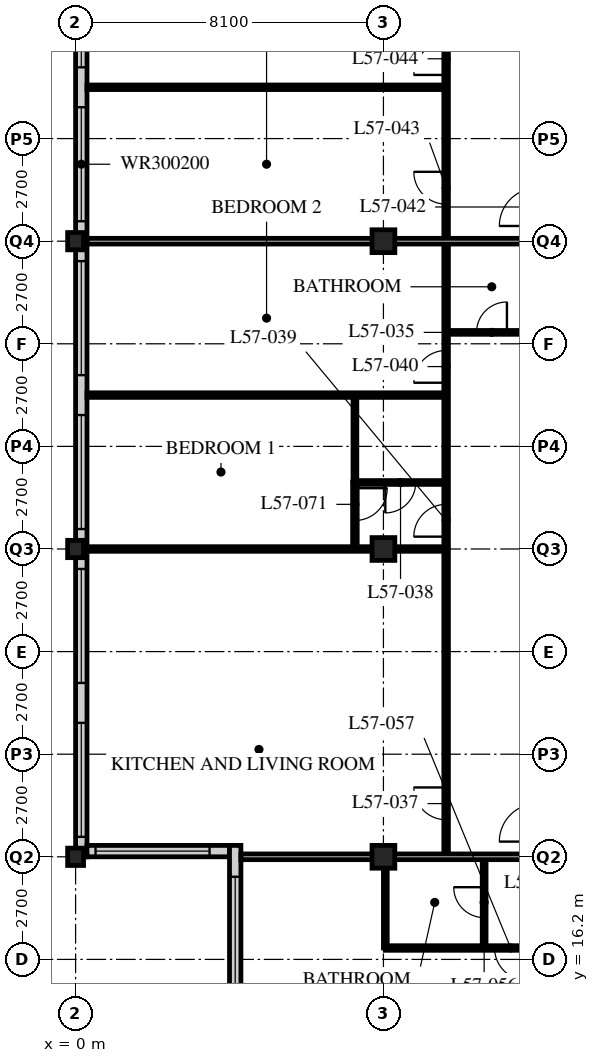
"""IFC4 building model, lengths in metres.
Left out: names, types, materials, properties, quantities, classifications, styles, units other than length and angle.
Written with IfcOpenShell. Run it as: python <this file> out.ifc"""

import sys

from ifc_helpers import new_model, si_unit, direction, frame, frame_2d, origin, origin_2d, place, context, subcontext, project, spatial, rectangle, hollow_rectangle, i_section, extrude, element, fill, save


model = new_model("IFC4")
c1 = context("Model", 3, precision=1e-05, world=origin(), true_north=direction((0.0, 1.0)))
c2 = subcontext(c1, "Body", "Model", "MODEL_VIEW")
j1 = project(units=[si_unit("LENGTHUNIT", "METRE"), si_unit("PLANEANGLEUNIT", "RADIAN")], contexts=[c1])
p1 = place(None, origin())
s1 = spatial("IfcSite", under=j1, at=p1, CompositionType="ELEMENT")
p2 = place(p1, origin())
s2 = spatial("IfcBuilding", under=s1, at=p2, CompositionType="ELEMENT")
p3 = place(p2, frame((0.0, 0.0, 220.8)))
s3 = spatial("IfcBuildingStorey", under=s2, at=p3, CompositionType="ELEMENT", Elevation=220.8)
for number, where, z_axis, x_axis in (
    (1, (0.0, 18.9, 0.0), (0.0, 0.0, 1.0), (1.0, 0.0, 0.0)),
    (2, (0.0, 27.0, 0.0), (0.0, 0.0, 1.0), (1.0, 0.0, 0.0)),
    (3, (0.0, 35.1, 0.0), (0.0, 0.0, 1.0), (1.0, 0.0, 0.0)),
):
    element("IfcColumn", number, at=place(p3, frame(where, z_axis=z_axis, x_axis=x_axis)), inside=s3, PredefinedType="COLUMN", context=c2, shape_type="SweptSolid", body=[
        extrude(i_section(OverallWidth=0.418, OverallDepth=0.456, WebThickness=0.042, FlangeThickness=0.067, FilletRadius=0.015, at=origin_2d()), origin(), (0.0, 0.0, 1.0), 3.6),
    ])
for number, where, z_axis, x_axis in (
    (4, (8.1, 18.9, 0.0), (0.0, 0.0, 1.0), (1.0, 0.0, 0.0)),
    (5, (8.1, 27.0, 0.0), (0.0, 0.0, 1.0), (1.0, 0.0, 0.0)),
    (6, (8.1, 35.1, 0.0), (0.0, 0.0, 1.0), (1.0, 0.0, 0.0)),
):
    element("IfcColumn", number, at=place(p3, frame(where, z_axis=z_axis, x_axis=x_axis)), inside=s3, PredefinedType="COLUMN", context=c2, shape_type="SweptSolid", body=[
        extrude(hollow_rectangle(XDim=0.6, YDim=0.6, WallThickness=0.05, at=origin_2d()), origin(), (0.0, 0.0, 1.0), 3.6),
    ])
p4 = place(p3, frame((0.15, 51.0, 0.0), z_axis=(0.0, 0.0, 1.0), x_axis=(0.0, -1.0, 0.0)))
e7 = element("IfcWall", 7, at=p4, inside=s3, PredefinedType="SOLIDWALL", context=c2, shape_type="SweptSolid", body=[
    extrude(rectangle(XDim=32.1, YDim=0.3, at=frame_2d((16.05, 0.0))), origin(), (0.0, 0.0, 1.0), 3.39),
])
p5 = place(p4, frame((0.225, 0.0, 0.6)))
e8 = element("IfcOpeningElement", 8, at=p5, cuts=e7, PredefinedType="OPENING", context=c2, shape_type="SweptSolid", body=[
    extrude(rectangle(XDim=3.0, YDim=2.0, at=frame_2d((1.5, 1.0))), frame((0.0, 0.16, 0.0), z_axis=(0.0, -1.0, 0.0), x_axis=(1.0, 0.0, 0.0)), (0.0, 0.0, 1.0), 0.32),
])
p6 = place(p4, frame((4.275, 0.0, 0.6)))
e9 = element("IfcOpeningElement", 9, at=p6, cuts=e7, PredefinedType="OPENING", context=c2, shape_type="SweptSolid", body=[
    extrude(rectangle(XDim=3.0, YDim=2.0, at=frame_2d((1.5, 1.0))), frame((0.0, 0.16, 0.0), z_axis=(0.0, -1.0, 0.0), x_axis=(1.0, 0.0, 0.0)), (0.0, 0.0, 1.0), 0.32),
])
p7 = place(p4, frame((8.325, 0.0, 0.6)))
e10 = element("IfcOpeningElement", 10, at=p7, cuts=e7, PredefinedType="OPENING", context=c2, shape_type="SweptSolid", body=[
    extrude(rectangle(XDim=3.0, YDim=2.0, at=frame_2d((1.5, 1.0))), frame((0.0, 0.16, 0.0), z_axis=(0.0, -1.0, 0.0), x_axis=(1.0, 0.0, 0.0)), (0.0, 0.0, 1.0), 0.32),
])
p8 = place(p4, frame((12.375, 0.0, 0.6)))
e11 = element("IfcOpeningElement", 11, at=p8, cuts=e7, PredefinedType="OPENING", context=c2, shape_type="SweptSolid", body=[
    extrude(rectangle(XDim=3.0, YDim=2.0, at=frame_2d((1.5, 1.0))), frame((0.0, 0.16, 0.0), z_axis=(0.0, -1.0, 0.0), x_axis=(1.0, 0.0, 0.0)), (0.0, 0.0, 1.0), 0.32),
])
p9 = place(p4, frame((16.425, 0.0, 0.6)))
e12 = element("IfcOpeningElement", 12, at=p9, cuts=e7, PredefinedType="OPENING", context=c2, shape_type="SweptSolid", body=[
    extrude(rectangle(XDim=3.0, YDim=2.0, at=frame_2d((1.5, 1.0))), frame((0.0, 0.16, 0.0), z_axis=(0.0, -1.0, 0.0), x_axis=(1.0, 0.0, 0.0)), (0.0, 0.0, 1.0), 0.32),
])
p10 = place(p4, frame((20.475, 0.0, 0.6)))
e13 = element("IfcOpeningElement", 13, at=p10, cuts=e7, PredefinedType="OPENING", context=c2, shape_type="SweptSolid", body=[
    extrude(rectangle(XDim=3.0, YDim=2.0, at=frame_2d((1.5, 1.0))), frame((0.0, 0.16, 0.0), z_axis=(0.0, -1.0, 0.0), x_axis=(1.0, 0.0, 0.0)), (0.0, 0.0, 1.0), 0.32),
])
p11 = place(p4, frame((24.525, 0.0, 0.6)))
e14 = element("IfcOpeningElement", 14, at=p11, cuts=e7, PredefinedType="OPENING", context=c2, shape_type="SweptSolid", body=[
    extrude(rectangle(XDim=3.0, YDim=2.0, at=frame_2d((1.5, 1.0))), frame((0.0, 0.16, 0.0), z_axis=(0.0, -1.0, 0.0), x_axis=(1.0, 0.0, 0.0)), (0.0, 0.0, 1.0), 0.32),
])
p12 = place(p4, frame((28.575, 0.0, 0.6)))
e15 = element("IfcOpeningElement", 15, at=p12, cuts=e7, PredefinedType="OPENING", context=c2, shape_type="SweptSolid", body=[
    extrude(rectangle(XDim=3.0, YDim=2.0, at=frame_2d((1.5, 1.0))), frame((0.0, 0.16, 0.0), z_axis=(0.0, -1.0, 0.0), x_axis=(1.0, 0.0, 0.0)), (0.0, 0.0, 1.0), 0.32),
])
p13 = place(p3, frame((0.3, 19.05, 0.0), z_axis=(0.0, 0.0, 1.0), x_axis=(1.0, 0.0, 0.0)))
e16 = element("IfcWall", 16, at=p13, inside=s3, PredefinedType="SOLIDWALL", context=c2, shape_type="SweptSolid", body=[
    extrude(rectangle(XDim=3.75, YDim=0.3, at=frame_2d((1.875, 0.0))), origin(), (0.0, 0.0, 1.0), 3.39),
])
p14 = place(p13, frame((0.225, 0.0, 0.6)))
e17 = element("IfcOpeningElement", 17, at=p14, cuts=e16, PredefinedType="OPENING", context=c2, shape_type="SweptSolid", body=[
    extrude(rectangle(XDim=3.0, YDim=2.0, at=frame_2d((1.5, 1.0))), frame((0.0, 0.16, 0.0), z_axis=(0.0, -1.0, 0.0), x_axis=(1.0, 0.0, 0.0)), (0.0, 0.0, 1.0), 0.32),
])
p15 = place(p3, frame((4.2, 19.2, 0.0), z_axis=(0.0, 0.0, 1.0), x_axis=(0.0, -1.0, 0.0)))
e18 = element("IfcWall", 18, at=p15, inside=s3, PredefinedType="SOLIDWALL", context=c2, shape_type="SweptSolid", body=[
    extrude(rectangle(XDim=4.35, YDim=0.3, at=frame_2d((2.175, 0.0))), origin(), (0.0, 0.0, 1.0), 3.39),
])
p16 = place(p15, frame((0.825, 0.0, 0.6)))
e19 = element("IfcOpeningElement", 19, at=p16, cuts=e18, PredefinedType="OPENING", context=c2, shape_type="SweptSolid", body=[
    extrude(rectangle(XDim=3.0, YDim=2.0, at=frame_2d((1.5, 1.0))), frame((0.0, 0.16, 0.0), z_axis=(0.0, -1.0, 0.0), x_axis=(1.0, 0.0, 0.0)), (0.0, 0.0, 1.0), 0.32),
])
p17 = place(p3, frame((9.75, 18.9, 0.0), z_axis=(0.0, 0.0, 1.0), x_axis=(0.0, 1.0, 0.0)))
e20 = element("IfcWall", 20, at=p17, inside=s3, PredefinedType="PARTITIONING", context=c2, shape_type="SweptSolid", body=[
    extrude(rectangle(XDim=24.3, YDim=0.12, at=frame_2d((12.15, 0.0))), origin(), (0.0, 0.0, 1.0), 3.39),
])
p18 = place(p17, frame((0.975, 0.0, 0.0)))
e21 = element("IfcOpeningElement", 21, at=p18, cuts=e20, PredefinedType="OPENING", context=c2, shape_type="SweptSolid", body=[
    extrude(rectangle(XDim=0.85, YDim=2.1, at=frame_2d((0.425, 1.05))), frame((0.0, 0.07, 0.0), z_axis=(0.0, -1.0, 0.0), x_axis=(1.0, 0.0, 0.0)), (0.0, 0.0, 1.0), 0.14),
])
p19 = place(p17, frame((8.425, 0.0, 0.0)))
e22 = element("IfcOpeningElement", 22, at=p19, cuts=e20, PredefinedType="OPENING", context=c2, shape_type="SweptSolid", body=[
    extrude(rectangle(XDim=0.85, YDim=2.1, at=frame_2d((0.425, 1.05))), frame((0.0, 0.07, 0.0), z_axis=(0.0, -1.0, 0.0), x_axis=(1.0, 0.0, 0.0)), (0.0, 0.0, 1.0), 0.14),
])
p20 = place(p17, frame((12.475, 0.0, 0.0)))
e23 = element("IfcOpeningElement", 23, at=p20, cuts=e20, PredefinedType="OPENING", context=c2, shape_type="SweptSolid", body=[
    extrude(rectangle(XDim=0.85, YDim=2.1, at=frame_2d((0.425, 1.05))), frame((0.0, 0.07, 0.0), z_axis=(0.0, -1.0, 0.0), x_axis=(1.0, 0.0, 0.0)), (0.0, 0.0, 1.0), 0.14),
])
p21 = place(p17, frame((17.175, 0.0, 0.0)))
e24 = element("IfcOpeningElement", 24, at=p21, cuts=e20, PredefinedType="OPENING", context=c2, shape_type="SweptSolid", body=[
    extrude(rectangle(XDim=0.85, YDim=2.1, at=frame_2d((0.425, 1.05))), frame((0.0, 0.07, 0.0), z_axis=(0.0, -1.0, 0.0), x_axis=(1.0, 0.0, 0.0)), (0.0, 0.0, 1.0), 0.14),
])
p22 = place(p17, frame((20.575, 0.0, 0.0)))
e25 = element("IfcOpeningElement", 25, at=p22, cuts=e20, PredefinedType="OPENING", context=c2, shape_type="SweptSolid", body=[
    extrude(rectangle(XDim=0.85, YDim=2.1, at=frame_2d((0.425, 1.05))), frame((0.0, 0.07, 0.0), z_axis=(0.0, -1.0, 0.0), x_axis=(1.0, 0.0, 0.0)), (0.0, 0.0, 1.0), 0.14),
])
p23 = place(p3, frame((12.15, 32.7, 0.0), z_axis=(0.0, 0.0, 1.0), x_axis=(-1.0, 0.0, 0.0)))
e26 = element("IfcWall", 26, at=p23, inside=s3, PredefinedType="PARTITIONING", context=c2, shape_type="SweptSolid", body=[
    extrude(rectangle(XDim=2.4, YDim=0.1, at=frame_2d((1.2, 0.0))), origin(), (0.0, 0.0, 1.0), 3.39),
])
p24 = place(p23, frame((0.8, 0.0, 0.0)))
e27 = element("IfcOpeningElement", 27, at=p24, cuts=e26, PredefinedType="OPENING", context=c2, shape_type="SweptSolid", body=[
    extrude(rectangle(XDim=0.8, YDim=2.1, at=frame_2d((0.4, 1.05))), frame((0.0, 0.06, 0.0), z_axis=(0.0, -1.0, 0.0), x_axis=(1.0, 0.0, 0.0)), (0.0, 0.0, 1.0), 0.12),
])
p25 = place(p3, frame((9.75, 28.75, 0.0), z_axis=(0.0, 0.0, 1.0), x_axis=(-1.0, 0.0, 0.0)))
e28 = element("IfcWall", 28, at=p25, inside=s3, PredefinedType="PARTITIONING", context=c2, shape_type="SweptSolid", body=[
    extrude(rectangle(XDim=2.4, YDim=0.1, at=frame_2d((1.2, 0.0))), origin(), (0.0, 0.0, 1.0), 3.39),
])
p26 = place(p25, frame((0.8, 0.0, 0.0)))
e29 = element("IfcOpeningElement", 29, at=p26, cuts=e28, PredefinedType="OPENING", context=c2, shape_type="SweptSolid", body=[
    extrude(rectangle(XDim=0.8, YDim=2.1, at=frame_2d((0.4, 1.05))), frame((0.0, 0.06, 0.0), z_axis=(0.0, -1.0, 0.0), x_axis=(1.0, 0.0, 0.0)), (0.0, 0.0, 1.0), 0.12),
])
p27 = place(p3, frame((7.35, 28.75, 0.0), z_axis=(0.0, 0.0, 1.0), x_axis=(0.0, 1.0, 0.0)))
e30 = element("IfcWall", 30, at=p27, inside=s3, PredefinedType="PARTITIONING", context=c2, shape_type="SweptSolid", body=[
    extrude(rectangle(XDim=2.3, YDim=0.1, at=frame_2d((1.15, 0.0))), origin(), (0.0, 0.0, 1.0), 3.39),
])
p28 = place(p3, frame((9.75, 27.0, 0.0), z_axis=(0.0, 0.0, 1.0), x_axis=(-1.0, 0.0, 0.0)))
e31 = element("IfcWall", 31, at=p28, inside=s3, PredefinedType="PARTITIONING", context=c2, shape_type="SweptSolid", body=[
    extrude(rectangle(XDim=9.45, YDim=0.12, at=frame_2d((4.725, 0.0))), origin(), (0.0, 0.0, 1.0), 2.628),
])
p29 = place(p3, frame((9.75, 31.05, 0.0), z_axis=(0.0, 0.0, 1.0), x_axis=(-1.0, 0.0, 0.0)))
e32 = element("IfcWall", 32, at=p29, inside=s3, PredefinedType="PARTITIONING", context=c2, shape_type="SweptSolid", body=[
    extrude(rectangle(XDim=9.45, YDim=0.12, at=frame_2d((4.725, 0.0))), origin(), (0.0, 0.0, 1.0), 3.39),
])
p30 = place(p3, frame((12.15, 35.1, 0.0), z_axis=(0.0, 0.0, 1.0), x_axis=(-1.0, 0.0, 0.0)))
e33 = element("IfcWall", 33, at=p30, inside=s3, PredefinedType="PARTITIONING", context=c2, shape_type="SweptSolid", body=[
    extrude(rectangle(XDim=11.85, YDim=0.15, at=frame_2d((5.925, 0.0))), origin(), (0.0, 0.0, 1.0), 2.628),
])
p31 = place(p3, frame((9.75, 39.15, 0.0), z_axis=(0.0, 0.0, 1.0), x_axis=(-1.0, 0.0, 0.0)))
e34 = element("IfcWall", 34, at=p31, inside=s3, PredefinedType="PARTITIONING", context=c2, shape_type="SweptSolid", body=[
    extrude(rectangle(XDim=9.45, YDim=0.12, at=frame_2d((4.725, 0.0))), origin(), (0.0, 0.0, 1.0), 3.39),
])
p32 = place(p3, frame((10.75, 18.9, 0.0), z_axis=(0.0, 0.0, 1.0), x_axis=(0.0, -1.0, 0.0)))
e35 = element("IfcWall", 35, at=p32, inside=s3, PredefinedType="PARTITIONING", context=c2, shape_type="SweptSolid", body=[
    extrude(rectangle(XDim=2.4, YDim=0.1, at=frame_2d((1.2, 0.0))), origin(), (0.0, 0.0, 1.0), 3.39),
])
p33 = place(p32, frame((0.8, 0.0, 0.0)))
e36 = element("IfcOpeningElement", 36, at=p33, cuts=e35, PredefinedType="OPENING", context=c2, shape_type="SweptSolid", body=[
    extrude(rectangle(XDim=0.8, YDim=2.1, at=frame_2d((0.4, 1.05))), frame((0.0, 0.06, 0.0), z_axis=(0.0, -1.0, 0.0), x_axis=(1.0, 0.0, 0.0)), (0.0, 0.0, 1.0), 0.12),
])
p34 = place(p3, frame((8.15, 18.9, 0.0), z_axis=(0.0, 0.0, 1.0), x_axis=(0.0, -1.0, 0.0)))
e37 = element("IfcWall", 37, at=p34, inside=s3, PredefinedType="PARTITIONING", context=c2, shape_type="SweptSolid", body=[
    extrude(rectangle(XDim=2.4, YDim=0.1, at=frame_2d((1.2, 0.0))), origin(), (0.0, 0.0, 1.0), 2.628),
])
p35 = place(p3, frame((8.15, 16.5, 0.0), z_axis=(0.0, 0.0, 1.0), x_axis=(1.0, 0.0, 0.0)))
e38 = element("IfcWall", 38, at=p35, inside=s3, PredefinedType="PARTITIONING", context=c2, shape_type="SweptSolid", body=[
    extrude(rectangle(XDim=24.25, YDim=0.12, at=frame_2d((12.125, 0.0))), origin(), (0.0, 0.0, 1.0), 3.39),
])
p36 = place(p35, frame((9.025, 0.0, 0.0)))
e39 = element("IfcOpeningElement", 39, at=p36, cuts=e38, PredefinedType="OPENING", context=c2, shape_type="SweptSolid", body=[
    extrude(rectangle(XDim=0.85, YDim=2.1, at=frame_2d((0.425, 1.05))), frame((0.0, 0.07, 0.0), z_axis=(0.0, -1.0, 0.0), x_axis=(1.0, 0.0, 0.0)), (0.0, 0.0, 1.0), 0.14),
])
p37 = place(p35, frame((16.475, 0.0, 0.0)))
e40 = element("IfcOpeningElement", 40, at=p37, cuts=e38, PredefinedType="OPENING", context=c2, shape_type="SweptSolid", body=[
    extrude(rectangle(XDim=0.85, YDim=2.1, at=frame_2d((0.425, 1.05))), frame((0.0, 0.07, 0.0), z_axis=(0.0, -1.0, 0.0), x_axis=(1.0, 0.0, 0.0)), (0.0, 0.0, 1.0), 0.14),
])
p38 = place(p35, frame((20.525, 0.0, 0.0)))
e41 = element("IfcOpeningElement", 41, at=p38, cuts=e38, PredefinedType="OPENING", context=c2, shape_type="SweptSolid", body=[
    extrude(rectangle(XDim=0.85, YDim=2.1, at=frame_2d((0.425, 1.05))), frame((0.0, 0.07, 0.0), z_axis=(0.0, -1.0, 0.0), x_axis=(1.0, 0.0, 0.0)), (0.0, 0.0, 1.0), 0.14),
])
p39 = place(p35, frame((6.725, 0.0, 0.0)))
e42 = element("IfcOpeningElement", 42, at=p39, cuts=e38, PredefinedType="OPENING", context=c2, shape_type="SweptSolid", body=[
    extrude(rectangle(XDim=0.85, YDim=2.1, at=frame_2d((0.425, 1.05))), frame((0.0, 0.07, 0.0), z_axis=(0.0, -1.0, 0.0), x_axis=(1.0, 0.0, 0.0)), (0.0, 0.0, 1.0), 0.14),
])
p40 = place(p35, frame((2.875, 0.0, 0.0)))
e43 = element("IfcOpeningElement", 43, at=p40, cuts=e38, PredefinedType="OPENING", context=c2, shape_type="SweptSolid", body=[
    extrude(rectangle(XDim=0.85, YDim=2.1, at=frame_2d((0.425, 1.05))), frame((0.0, 0.07, 0.0), z_axis=(0.0, -1.0, 0.0), x_axis=(1.0, 0.0, 0.0)), (0.0, 0.0, 1.0), 0.14),
])
p41 = place(p3, frame((4.35, 18.9, 0.0), z_axis=(0.0, 0.0, 1.0), x_axis=(1.0, 0.0, 0.0)))
e44 = element("IfcWall", 44, at=p41, inside=s3, PredefinedType="PARTITIONING", context=c2, shape_type="SweptSolid", body=[
    extrude(rectangle(XDim=7.8, YDim=0.15, at=frame_2d((3.9, 0.0))), origin(), (0.0, 0.0, 1.0), 2.628),
])
p42 = place(p3, frame((7.35, 27.0, 0.0), z_axis=(0.0, 0.0, 1.0), x_axis=(0.0, 1.0, 0.0)))
e45 = element("IfcWall", 45, at=p42, inside=s3, PredefinedType="PARTITIONING", context=c2, shape_type="SweptSolid", body=[
    extrude(rectangle(XDim=1.76, YDim=0.12, at=frame_2d((0.88, 0.0))), origin(), (0.0, 0.0, 1.0), 3.39),
])
p43 = place(p42, frame((0.75, 0.0, 0.0)))
e46 = element("IfcOpeningElement", 46, at=p43, cuts=e45, PredefinedType="OPENING", context=c2, shape_type="SweptSolid", body=[
    extrude(rectangle(XDim=0.85, YDim=2.1, at=frame_2d((0.425, 1.05))), frame((0.0, 0.07, 0.0), z_axis=(0.0, -1.0, 0.0), x_axis=(1.0, 0.0, 0.0)), (0.0, 0.0, 1.0), 0.14),
])
p44 = place(p7, origin())
e47 = element("IfcWindow", 47, at=p44, inside=s3, PartitioningType="SINGLE_PANEL", PredefinedType="WINDOW", context=c2, shape_type="SweptSolid", body=[
    extrude(rectangle(XDim=3.0, YDim=2.0, at=frame_2d((1.5, 1.0))), frame((0.0, 0.03, 0.0), z_axis=(0.0, -1.0, 0.0), x_axis=(1.0, 0.0, 0.0)), (0.0, 0.0, 1.0), 0.06),
])
fill(e10, e47)
p45 = place(p8, origin())
e48 = element("IfcWindow", 48, at=p45, inside=s3, PartitioningType="SINGLE_PANEL", PredefinedType="WINDOW", context=c2, shape_type="SweptSolid", body=[
    extrude(rectangle(XDim=3.0, YDim=2.0, at=frame_2d((1.5, 1.0))), frame((0.0, 0.03, 0.0), z_axis=(0.0, -1.0, 0.0), x_axis=(1.0, 0.0, 0.0)), (0.0, 0.0, 1.0), 0.06),
])
fill(e11, e48)
p46 = place(p9, origin())
e49 = element("IfcWindow", 49, at=p46, inside=s3, PartitioningType="SINGLE_PANEL", PredefinedType="WINDOW", context=c2, shape_type="SweptSolid", body=[
    extrude(rectangle(XDim=3.0, YDim=2.0, at=frame_2d((1.5, 1.0))), frame((0.0, 0.03, 0.0), z_axis=(0.0, -1.0, 0.0), x_axis=(1.0, 0.0, 0.0)), (0.0, 0.0, 1.0), 0.06),
])
fill(e12, e49)
p47 = place(p10, origin())
e50 = element("IfcWindow", 50, at=p47, inside=s3, PartitioningType="SINGLE_PANEL", PredefinedType="WINDOW", context=c2, shape_type="SweptSolid", body=[
    extrude(rectangle(XDim=3.0, YDim=2.0, at=frame_2d((1.5, 1.0))), frame((0.0, 0.03, 0.0), z_axis=(0.0, -1.0, 0.0), x_axis=(1.0, 0.0, 0.0)), (0.0, 0.0, 1.0), 0.06),
])
fill(e13, e50)
p48 = place(p11, origin())
e51 = element("IfcWindow", 51, at=p48, inside=s3, PartitioningType="SINGLE_PANEL", PredefinedType="WINDOW", context=c2, shape_type="SweptSolid", body=[
    extrude(rectangle(XDim=3.0, YDim=2.0, at=frame_2d((1.5, 1.0))), frame((0.0, 0.03, 0.0), z_axis=(0.0, -1.0, 0.0), x_axis=(1.0, 0.0, 0.0)), (0.0, 0.0, 1.0), 0.06),
])
fill(e14, e51)
p49 = place(p12, origin())
e52 = element("IfcWindow", 52, at=p49, inside=s3, PartitioningType="SINGLE_PANEL", PredefinedType="WINDOW", context=c2, shape_type="SweptSolid", body=[
    extrude(rectangle(XDim=3.0, YDim=2.0, at=frame_2d((1.5, 1.0))), frame((0.0, 0.03, 0.0), z_axis=(0.0, -1.0, 0.0), x_axis=(1.0, 0.0, 0.0)), (0.0, 0.0, 1.0), 0.06),
])
fill(e15, e52)
p50 = place(p14, origin())
e53 = element("IfcWindow", 53, at=p50, inside=s3, PartitioningType="SINGLE_PANEL", PredefinedType="WINDOW", context=c2, shape_type="SweptSolid", body=[
    extrude(rectangle(XDim=3.0, YDim=2.0, at=frame_2d((1.5, 1.0))), frame((0.0, 0.03, 0.0), z_axis=(0.0, -1.0, 0.0), x_axis=(1.0, 0.0, 0.0)), (0.0, 0.0, 1.0), 0.06),
])
fill(e17, e53)
p51 = place(p16, origin())
e54 = element("IfcWindow", 54, at=p51, inside=s3, PartitioningType="SINGLE_PANEL", PredefinedType="WINDOW", context=c2, shape_type="SweptSolid", body=[
    extrude(rectangle(XDim=3.0, YDim=2.0, at=frame_2d((1.5, 1.0))), frame((0.0, 0.03, 0.0), z_axis=(0.0, -1.0, 0.0), x_axis=(1.0, 0.0, 0.0)), (0.0, 0.0, 1.0), 0.06),
])
fill(e19, e54)
p52 = place(p24, origin())
e55 = element("IfcDoor", 55, at=p52, inside=s3, OperationType="SINGLE_SWING_RIGHT", PredefinedType="DOOR", context=c2, shape_type="SweptSolid", body=[
    extrude(rectangle(XDim=0.8, YDim=2.1, at=frame_2d((0.4, 1.05))), frame((0.0, 0.025, 0.0), z_axis=(0.0, -1.0, 0.0), x_axis=(1.0, 0.0, 0.0)), (0.0, 0.0, 1.0), 0.05),
])
fill(e27, e55)
p53 = place(p18, origin())
e56 = element("IfcDoor", 56, at=p53, inside=s3, OperationType="SINGLE_SWING_RIGHT", PredefinedType="DOOR", context=c2, shape_type="SweptSolid", body=[
    extrude(rectangle(XDim=0.85, YDim=2.1, at=frame_2d((0.425, 1.05))), frame((0.0, 0.025, 0.0), z_axis=(0.0, -1.0, 0.0), x_axis=(1.0, 0.0, 0.0)), (0.0, 0.0, 1.0), 0.05),
])
fill(e21, e56)
p54 = place(p26, origin())
e57 = element("IfcDoor", 57, at=p54, inside=s3, OperationType="SINGLE_SWING_RIGHT", PredefinedType="DOOR", context=c2, shape_type="SweptSolid", body=[
    extrude(rectangle(XDim=0.8, YDim=2.1, at=frame_2d((0.4, 1.05))), frame((0.0, 0.025, 0.0), z_axis=(0.0, -1.0, 0.0), x_axis=(1.0, 0.0, 0.0)), (0.0, 0.0, 1.0), 0.05),
])
fill(e29, e57)
p55 = place(p19, origin())
e58 = element("IfcDoor", 58, at=p55, inside=s3, OperationType="SINGLE_SWING_LEFT", PredefinedType="DOOR", context=c2, shape_type="SweptSolid", body=[
    extrude(rectangle(XDim=0.85, YDim=2.1, at=frame_2d((0.425, 1.05))), frame((0.0, 0.025, 0.0), z_axis=(0.0, -1.0, 0.0), x_axis=(1.0, 0.0, 0.0)), (0.0, 0.0, 1.0), 0.05),
])
fill(e22, e58)
p56 = place(p20, origin())
e59 = element("IfcDoor", 59, at=p56, inside=s3, OperationType="SINGLE_SWING_LEFT", PredefinedType="DOOR", context=c2, shape_type="SweptSolid", body=[
    extrude(rectangle(XDim=0.85, YDim=2.1, at=frame_2d((0.425, 1.05))), frame((0.0, 0.025, 0.0), z_axis=(0.0, -1.0, 0.0), x_axis=(1.0, 0.0, 0.0)), (0.0, 0.0, 1.0), 0.05),
])
fill(e23, e59)
p57 = place(p21, origin())
e60 = element("IfcDoor", 60, at=p57, inside=s3, OperationType="SINGLE_SWING_RIGHT", PredefinedType="DOOR", context=c2, shape_type="SweptSolid", body=[
    extrude(rectangle(XDim=0.85, YDim=2.1, at=frame_2d((0.425, 1.05))), frame((0.0, 0.025, 0.0), z_axis=(0.0, -1.0, 0.0), x_axis=(1.0, 0.0, 0.0)), (0.0, 0.0, 1.0), 0.05),
])
fill(e24, e60)
p58 = place(p22, origin())
e61 = element("IfcDoor", 61, at=p58, inside=s3, OperationType="SINGLE_SWING_LEFT", PredefinedType="DOOR", context=c2, shape_type="SweptSolid", body=[
    extrude(rectangle(XDim=0.85, YDim=2.1, at=frame_2d((0.425, 1.05))), frame((0.0, 0.025, 0.0), z_axis=(0.0, -1.0, 0.0), x_axis=(1.0, 0.0, 0.0)), (0.0, 0.0, 1.0), 0.05),
])
fill(e25, e61)
p59 = place(p33, origin())
e62 = element("IfcDoor", 62, at=p59, inside=s3, OperationType="SINGLE_SWING_RIGHT", PredefinedType="DOOR", context=c2, shape_type="SweptSolid", body=[
    extrude(rectangle(XDim=0.8, YDim=2.1, at=frame_2d((0.4, 1.05))), frame((0.0, 0.025, 0.0), z_axis=(0.0, -1.0, 0.0), x_axis=(1.0, 0.0, 0.0)), (0.0, 0.0, 1.0), 0.05),
])
fill(e36, e62)
p60 = place(p40, origin())
e63 = element("IfcDoor", 63, at=p60, inside=s3, OperationType="SINGLE_SWING_LEFT", PredefinedType="DOOR", context=c2, shape_type="SweptSolid", body=[
    extrude(rectangle(XDim=0.85, YDim=2.1, at=frame_2d((0.425, 1.05))), frame((0.0, 0.025, 0.0), z_axis=(0.0, -1.0, 0.0), x_axis=(1.0, 0.0, 0.0)), (0.0, 0.0, 1.0), 0.05),
])
fill(e43, e63)
p61 = place(p43, origin())
e64 = element("IfcDoor", 64, at=p61, inside=s3, OperationType="SINGLE_SWING_LEFT", PredefinedType="DOOR", context=c2, shape_type="SweptSolid", body=[
    extrude(rectangle(XDim=0.85, YDim=2.1, at=frame_2d((0.425, 1.05))), frame((0.0, 0.025, 0.0), z_axis=(0.0, -1.0, 0.0), x_axis=(1.0, 0.0, 0.0)), (0.0, 0.0, 1.0), 0.05),
])
fill(e46, e64)
save(model, sys.argv[1])
